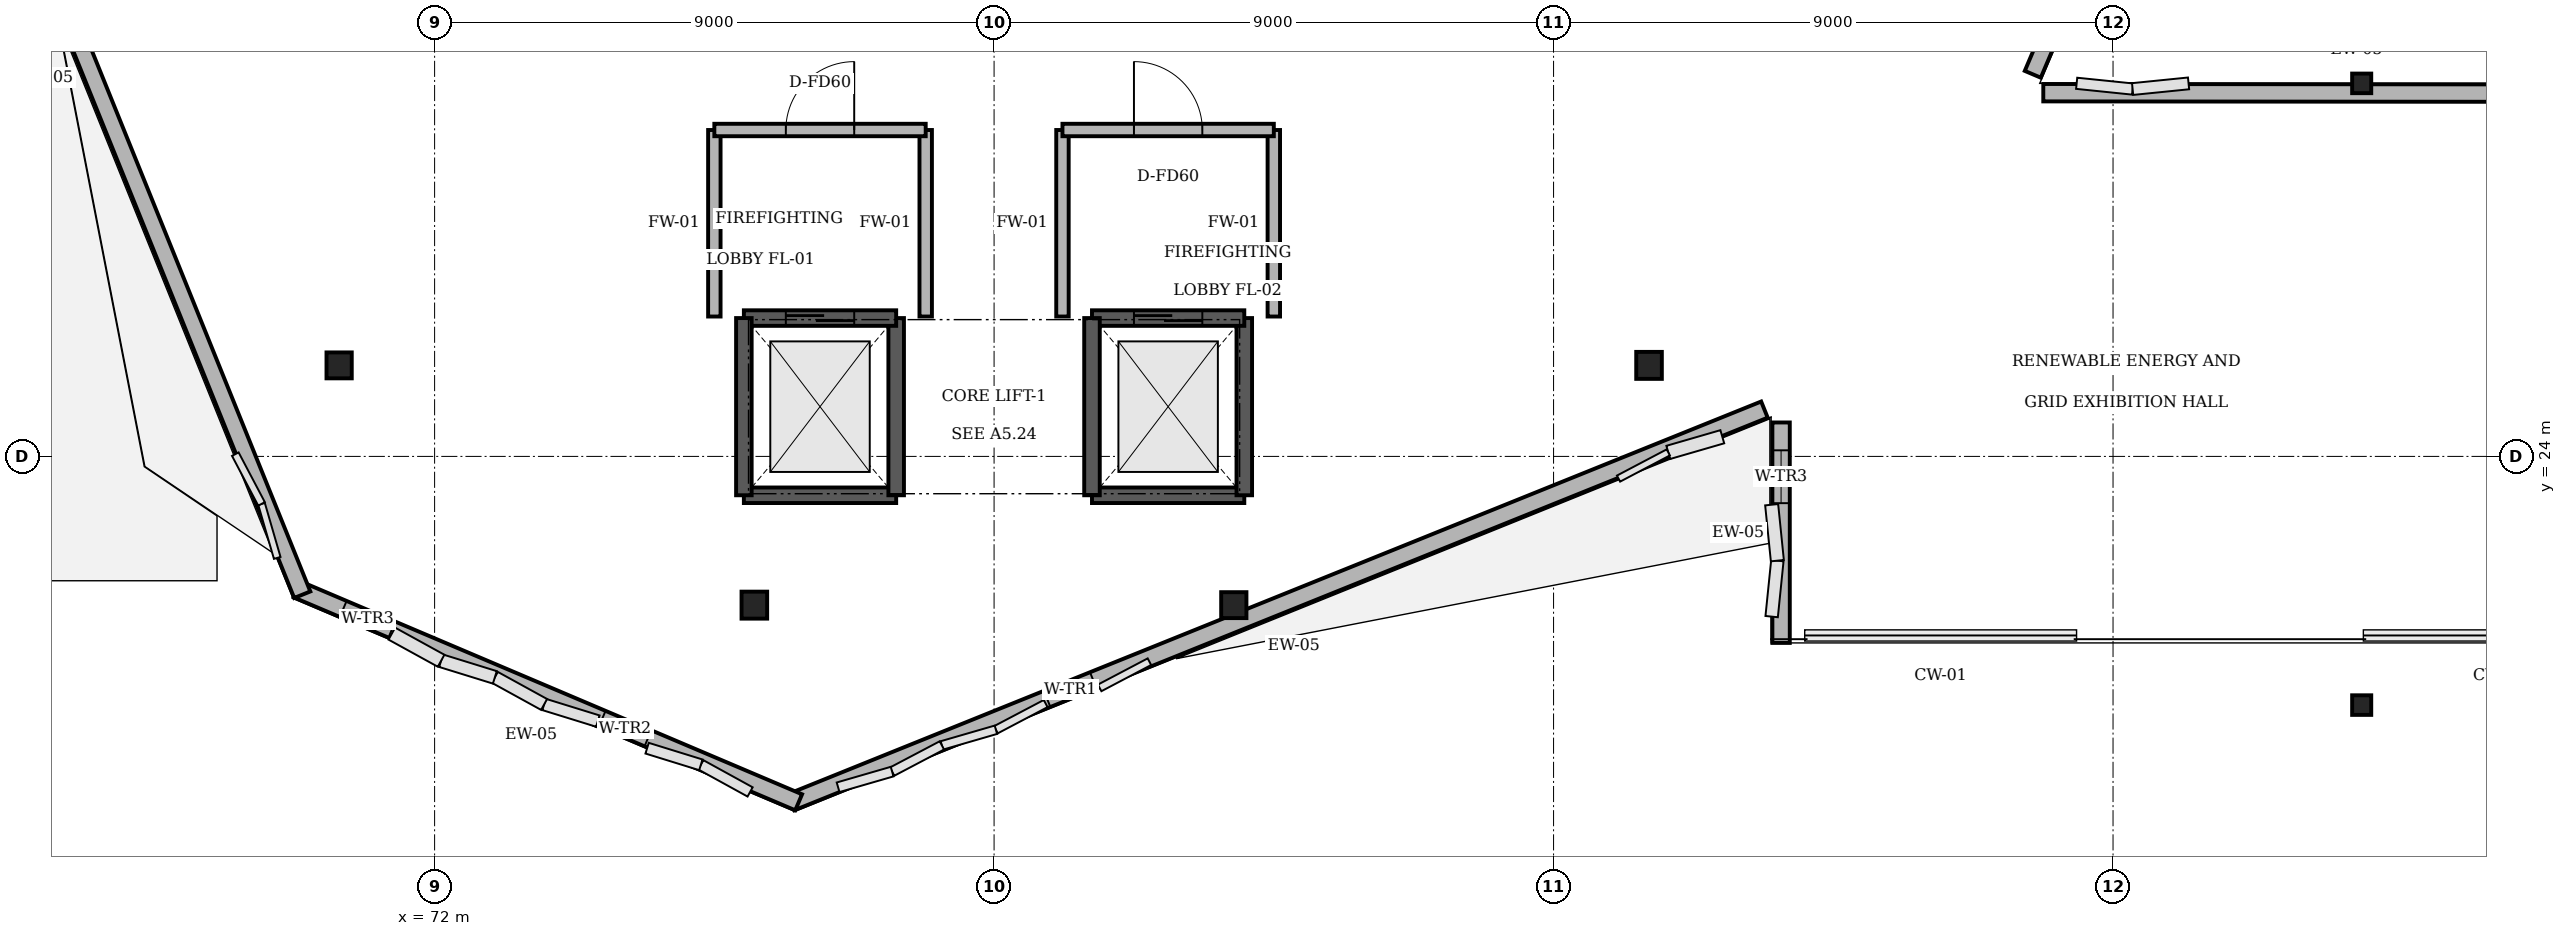
"""IFC4 building model, lengths in metres.
Left out: names, types, materials, properties, quantities, classifications, styles, units other than length and angle.
Written with IfcOpenShell. Run it as: python <this file> out.ifc"""

import sys

from ifc_helpers import new_model, si_unit, direction, frame, frame_2d, origin, origin_2d, place, context, subcontext, project, spatial, rectangle, i_section, extrude, element, fill, save


model = new_model("IFC4")
c1 = context("Model", 3, precision=1e-05, world=origin(), true_north=direction((0.0, 1.0)))
c2 = subcontext(c1, "Body", "Model", "MODEL_VIEW")
j1 = project(units=[si_unit("LENGTHUNIT", "METRE"), si_unit("PLANEANGLEUNIT", "RADIAN")], contexts=[c1])
p1 = place(None, origin())
s1 = spatial("IfcSite", under=j1, at=p1, CompositionType="ELEMENT")
p2 = place(p1, origin())
s2 = spatial("IfcBuilding", under=s1, at=p2, CompositionType="ELEMENT")
p3 = place(p2, frame((0.0, 0.0, 10.8)))
s3 = spatial("IfcBuildingStorey", under=s2, at=p3, CompositionType="ELEMENT", Elevation=10.8)
p4 = place(p3, frame((70.464, 25.464, 0.0), z_axis=(0.0, 0.0, 1.0), x_axis=(1.0, 0.0, 0.0)))
e1 = element("IfcColumn", 1, at=p4, inside=s3, PredefinedType="COLUMN", context=c2, shape_type="SweptSolid", body=[
    extrude(i_section(OverallWidth=0.406, OverallDepth=0.417, WebThickness=0.03, FlangeThickness=0.044, FilletRadius=0.015, at=origin_2d()), origin(), (0.0, 0.0, 1.0), 4.8),
])
p5 = place(p3, frame((77.144, 21.608, 0.0), z_axis=(0.0, 0.0, 1.0), x_axis=(1.0, 0.0, 0.0)))
e2 = element("IfcColumn", 2, at=p5, inside=s3, PredefinedType="COLUMN", context=c2, shape_type="SweptSolid", body=[
    extrude(i_section(OverallWidth=0.412, OverallDepth=0.434, WebThickness=0.036, FlangeThickness=0.044, FilletRadius=0.015, at=origin_2d()), origin(), (0.0, 0.0, 1.0), 4.8),
])
p6 = place(p3, frame((84.856, 21.608, 0.0), z_axis=(0.0, 0.0, 1.0), x_axis=(1.0, 0.0, 0.0)))
e3 = element("IfcColumn", 3, at=p6, inside=s3, PredefinedType="COLUMN", context=c2, shape_type="SweptSolid", body=[
    extrude(i_section(OverallWidth=0.406, OverallDepth=0.417, WebThickness=0.03, FlangeThickness=0.044, FilletRadius=0.015, at=origin_2d()), origin(), (0.0, 0.0, 1.0), 4.8),
])
p7 = place(p3, frame((91.536, 25.464, 0.0), z_axis=(0.0, 0.0, 1.0), x_axis=(1.0, 0.0, 0.0)))
e4 = element("IfcColumn", 4, at=p7, inside=s3, PredefinedType="COLUMN", context=c2, shape_type="SweptSolid", body=[
    extrude(i_section(OverallWidth=0.412, OverallDepth=0.434, WebThickness=0.036, FlangeThickness=0.044, FilletRadius=0.015, at=origin_2d()), origin(), (0.0, 0.0, 1.0), 4.8),
])
for number, where, z_axis, x_axis in (
    (5, (103.0, 20.0, 0.0), (0.0, 0.0, 1.0), (1.0, 0.0, 0.0)),
    (6, (103.0, 30.0, 0.0), (0.0, 0.0, 1.0), (1.0, 0.0, 0.0)),
):
    element("IfcColumn", number, at=place(p3, frame(where, z_axis=z_axis, x_axis=x_axis)), inside=s3, PredefinedType="COLUMN", context=c2, shape_type="SweptSolid", body=[
        extrude(i_section(OverallWidth=0.307, OverallDepth=0.315, WebThickness=0.012, FlangeThickness=0.019, FilletRadius=0.013, at=origin_2d()), origin(), (0.0, 0.0, 1.0), 4.8),
    ])
p8 = place(p3, frame((93.66, 21.0, 0.0), z_axis=(0.0, 0.0, 1.0), x_axis=(-6.8851556e-05, 0.99999999763, 0.0)))
e7 = element("IfcWall", 7, at=p8, inside=s3, PredefinedType="SOLIDWALL", context=c2, shape_type="SweptSolid", body=[
    extrude(rectangle(XDim=3.546, YDim=0.28, at=frame_2d((1.773, 0.0))), origin(), (0.0, 0.0, 1.0), 4.12),
])
p9 = place(p8, frame((2.248, 0.0, 1.05)))
e8 = element("IfcOpeningElement", 8, at=p9, cuts=e7, PredefinedType="OPENING", context=c2, shape_type="SweptSolid", body=[
    extrude(rectangle(XDim=0.85, YDim=1.6, at=frame_2d((0.425, 0.8))), frame((0.0, 0.15, 0.0), z_axis=(0.0, -1.0, 0.0), x_axis=(1.0, 0.0, 0.0)), (0.0, 0.0, 1.0), 0.3),
])
p10 = place(p3, frame((93.392, 24.753, 0.0), z_axis=(0.0, 0.0, 1.0), x_axis=(-0.927410810768, -0.374044366448, 0.0)))
e9 = element("IfcWall", 9, at=p10, inside=s3, PredefinedType="SOLIDWALL", context=c2, shape_type="SweptSolid", body=[
    extrude(rectangle(XDim=16.884, YDim=0.28, at=frame_2d((8.442, 0.0))), origin(), (0.0, 0.0, 1.0), 3.484),
])
p11 = place(p10, frame((11.642, 0.0, 1.05)))
e10 = element("IfcOpeningElement", 10, at=p11, cuts=e9, PredefinedType="OPENING", context=c2, shape_type="SweptSolid", body=[
    extrude(rectangle(XDim=0.8, YDim=1.5, at=frame_2d((0.4, 0.75))), frame((0.0, 0.15, 0.0), z_axis=(0.0, -1.0, 0.0), x_axis=(1.0, 0.0, 0.0)), (0.0, 0.0, 1.0), 0.3),
])
p12 = place(p3, frame((77.856, 18.437, 0.0), z_axis=(0.0, 0.0, 1.0), x_axis=(-0.920511993367, 0.390714307478, 0.0)))
e11 = element("IfcWall", 11, at=p12, inside=s3, PredefinedType="SOLIDWALL", context=c2, shape_type="SweptSolid", body=[
    extrude(rectangle(XDim=8.768, YDim=0.28, at=frame_2d((4.384, 0.0))), origin(), (0.0, 0.0, 1.0), 3.629),
])
p13 = place(p12, frame((2.634, 0.0, 1.05)))
e12 = element("IfcOpeningElement", 12, at=p13, cuts=e11, PredefinedType="OPENING", context=c2, shape_type="SweptSolid", body=[
    extrude(rectangle(XDim=0.8, YDim=1.7, at=frame_2d((0.4, 0.85))), frame((0.0, 0.15, 0.0), z_axis=(0.0, -1.0, 0.0), x_axis=(1.0, 0.0, 0.0)), (0.0, 0.0, 1.0), 0.3),
])
p14 = place(p12, frame((7.109, 0.0, 1.05)))
e13 = element("IfcOpeningElement", 13, at=p14, cuts=e11, PredefinedType="OPENING", context=c2, shape_type="SweptSolid", body=[
    extrude(rectangle(XDim=0.85, YDim=1.6, at=frame_2d((0.425, 0.8))), frame((0.0, 0.15, 0.0), z_axis=(0.0, -1.0, 0.0), x_axis=(1.0, 0.0, 0.0)), (0.0, 0.0, 1.0), 0.3),
])
p15 = place(p3, frame((69.871, 21.775, 0.0), z_axis=(0.0, 0.0, 1.0), x_axis=(-0.37460574737, 0.927184196391, 0.0)))
e14 = element("IfcWall", 14, at=p15, inside=s3, PredefinedType="SOLIDWALL", context=c2, shape_type="SweptSolid", body=[
    extrude(rectangle(XDim=18.5, YDim=0.28, at=frame_2d((9.25, 0.0))), origin(), (0.0, 0.0, 1.0), 3.634),
])
p16 = place(p15, frame((11.55, 0.0, 1.05)))
e15 = element("IfcOpeningElement", 15, at=p16, cuts=e14, PredefinedType="OPENING", context=c2, shape_type="SweptSolid", body=[
    extrude(rectangle(XDim=0.8, YDim=1.5, at=frame_2d((0.4, 0.75))), frame((0.0, 0.15, 0.0), z_axis=(0.0, -1.0, 0.0), x_axis=(1.0, 0.0, 0.0)), (0.0, 0.0, 1.0), 0.3),
])
p17 = place(p15, frame((16.05, 0.0, 1.05)))
e16 = element("IfcOpeningElement", 16, at=p17, cuts=e14, PredefinedType="OPENING", context=c2, shape_type="SweptSolid", body=[
    extrude(rectangle(XDim=0.8, YDim=1.7, at=frame_2d((0.4, 0.85))), frame((0.0, 0.15, 0.0), z_axis=(0.0, -1.0, 0.0), x_axis=(1.0, 0.0, 0.0)), (0.0, 0.0, 1.0), 0.3),
])
p18 = place(p3, frame((99.245, 33.765, 0.0), z_axis=(0.0, 0.0, 1.0), x_axis=(-0.390731644119, -0.92050463458, 0.0)))
e17 = element("IfcWall", 17, at=p18, inside=s3, PredefinedType="SOLIDWALL", context=c2, shape_type="SweptSolid", body=[
    extrude(rectangle(XDim=3.931, YDim=0.28, at=frame_2d((1.966, 0.0))), origin(), (0.0, 0.0, 1.0), 3.947),
])
p19 = place(p18, frame((2.466, 0.0, 1.05)))
e18 = element("IfcOpeningElement", 18, at=p19, cuts=e17, PredefinedType="OPENING", context=c2, shape_type="SweptSolid", body=[
    extrude(rectangle(XDim=0.8, YDim=1.7, at=frame_2d((0.4, 0.85))), frame((0.0, 0.15, 0.0), z_axis=(0.0, -1.0, 0.0), x_axis=(1.0, 0.0, 0.0)), (0.0, 0.0, 1.0), 0.3),
])
p20 = place(p3, frame((97.878, 29.85, 0.0), z_axis=(0.0, 0.0, 1.0), x_axis=(0.999999619377, -0.000872494275, 0.0)))
e19 = element("IfcWall", 19, at=p20, inside=s3, PredefinedType="SOLIDWALL", context=c2, shape_type="SweptSolid", body=[
    extrude(rectangle(XDim=10.073, YDim=0.28, at=frame_2d((5.037, 0.0))), origin(), (0.0, 0.0, 1.0), 3.573),
])
p21 = place(p3, frame((76.975, 23.375, 0.0), z_axis=(0.0, 0.0, 1.0), x_axis=(1.0, 0.0, 0.0)))
e20 = element("IfcWall", 20, at=p21, inside=s3, PredefinedType="SOLIDWALL", context=c2, shape_type="SweptSolid", body=[
    extrude(rectangle(XDim=2.45, YDim=0.25, at=frame_2d((1.225, 0.0))), origin(), (0.0, 0.0, 1.0), 4.8),
])
p22 = place(p3, frame((79.425, 23.375, 0.0), z_axis=(0.0, 0.0, 1.0), x_axis=(0.0, 1.0, 0.0)))
e21 = element("IfcWall", 21, at=p22, inside=s3, PredefinedType="SOLIDWALL", context=c2, shape_type="SweptSolid", body=[
    extrude(rectangle(XDim=2.85, YDim=0.25, at=frame_2d((1.425, 0.0))), origin(), (0.0, 0.0, 1.0), 4.8),
])
p23 = place(p3, frame((79.425, 26.225, 0.0), z_axis=(0.0, 0.0, 1.0), x_axis=(-1.0, 0.0, 0.0)))
e22 = element("IfcWall", 22, at=p23, inside=s3, PredefinedType="SOLIDWALL", context=c2, shape_type="SweptSolid", body=[
    extrude(rectangle(XDim=2.45, YDim=0.25, at=frame_2d((1.225, 0.0))), origin(), (0.0, 0.0, 1.0), 4.8),
])
p24 = place(p23, frame((0.675, 0.0, 0.0)))
e23 = element("IfcOpeningElement", 23, at=p24, cuts=e22, PredefinedType="OPENING", context=c2, shape_type="SweptSolid", body=[
    extrude(rectangle(XDim=1.1, YDim=2.2, at=frame_2d((0.55, 1.1))), frame((0.0, 0.135, 0.0), z_axis=(0.0, -1.0, 0.0), x_axis=(1.0, 0.0, 0.0)), (0.0, 0.0, 1.0), 0.27),
])
p25 = place(p3, frame((76.975, 26.225, 0.0), z_axis=(0.0, 0.0, 1.0), x_axis=(0.0, -1.0, 0.0)))
e24 = element("IfcWall", 24, at=p25, inside=s3, PredefinedType="SOLIDWALL", context=c2, shape_type="SweptSolid", body=[
    extrude(rectangle(XDim=2.85, YDim=0.25, at=frame_2d((1.425, 0.0))), origin(), (0.0, 0.0, 1.0), 4.8),
])
p26 = place(p3, frame((76.5, 26.25, 0.0), z_axis=(0.0, 0.0, 1.0), x_axis=(0.0, 1.0, 0.0)))
e25 = element("IfcWall", 25, at=p26, inside=s3, PredefinedType="SOLIDWALL", context=c2, shape_type="SweptSolid", body=[
    extrude(rectangle(XDim=3.0, YDim=0.2, at=frame_2d((1.5, 0.0))), origin(), (0.0, 0.0, 1.0), 3.629),
])
p27 = place(p3, frame((79.9, 26.25, 0.0), z_axis=(0.0, 0.0, 1.0), x_axis=(0.0, 1.0, 0.0)))
e26 = element("IfcWall", 26, at=p27, inside=s3, PredefinedType="SOLIDWALL", context=c2, shape_type="SweptSolid", body=[
    extrude(rectangle(XDim=3.0, YDim=0.2, at=frame_2d((1.5, 0.0))), origin(), (0.0, 0.0, 1.0), 3.99),
])
p28 = place(p3, frame((76.5, 29.25, 0.0), z_axis=(0.0, 0.0, 1.0), x_axis=(1.0, 0.0, 0.0)))
e27 = element("IfcWall", 27, at=p28, inside=s3, PredefinedType="SOLIDWALL", context=c2, shape_type="SweptSolid", body=[
    extrude(rectangle(XDim=3.4, YDim=0.2, at=frame_2d((1.7, 0.0))), origin(), (0.0, 0.0, 1.0), 3.629),
])
p29 = place(p28, frame((1.15, 0.0, 0.0)))
e28 = element("IfcOpeningElement", 28, at=p29, cuts=e27, PredefinedType="OPENING", context=c2, shape_type="SweptSolid", body=[
    extrude(rectangle(XDim=1.1, YDim=2.2, at=frame_2d((0.55, 1.1))), frame((0.0, 0.11, 0.0), z_axis=(0.0, -1.0, 0.0), x_axis=(1.0, 0.0, 0.0)), (0.0, 0.0, 1.0), 0.22),
])
p30 = place(p3, frame((82.575, 23.375, 0.0), z_axis=(0.0, 0.0, 1.0), x_axis=(1.0, 0.0, 0.0)))
e29 = element("IfcWall", 29, at=p30, inside=s3, PredefinedType="SOLIDWALL", context=c2, shape_type="SweptSolid", body=[
    extrude(rectangle(XDim=2.45, YDim=0.25, at=frame_2d((1.225, 0.0))), origin(), (0.0, 0.0, 1.0), 4.8),
])
p31 = place(p3, frame((85.025, 23.375, 0.0), z_axis=(0.0, 0.0, 1.0), x_axis=(0.0, 1.0, 0.0)))
e30 = element("IfcWall", 30, at=p31, inside=s3, PredefinedType="SOLIDWALL", context=c2, shape_type="SweptSolid", body=[
    extrude(rectangle(XDim=2.85, YDim=0.25, at=frame_2d((1.425, 0.0))), origin(), (0.0, 0.0, 1.0), 4.8),
])
p32 = place(p3, frame((85.025, 26.225, 0.0), z_axis=(0.0, 0.0, 1.0), x_axis=(-1.0, 0.0, 0.0)))
e31 = element("IfcWall", 31, at=p32, inside=s3, PredefinedType="SOLIDWALL", context=c2, shape_type="SweptSolid", body=[
    extrude(rectangle(XDim=2.45, YDim=0.25, at=frame_2d((1.225, 0.0))), origin(), (0.0, 0.0, 1.0), 4.8),
])
p33 = place(p32, frame((0.675, 0.0, 0.0)))
e32 = element("IfcOpeningElement", 32, at=p33, cuts=e31, PredefinedType="OPENING", context=c2, shape_type="SweptSolid", body=[
    extrude(rectangle(XDim=1.1, YDim=2.2, at=frame_2d((0.55, 1.1))), frame((0.0, 0.135, 0.0), z_axis=(0.0, -1.0, 0.0), x_axis=(1.0, 0.0, 0.0)), (0.0, 0.0, 1.0), 0.27),
])
p34 = place(p3, frame((82.575, 26.225, 0.0), z_axis=(0.0, 0.0, 1.0), x_axis=(0.0, -1.0, 0.0)))
e33 = element("IfcWall", 33, at=p34, inside=s3, PredefinedType="SOLIDWALL", context=c2, shape_type="SweptSolid", body=[
    extrude(rectangle(XDim=2.85, YDim=0.25, at=frame_2d((1.425, 0.0))), origin(), (0.0, 0.0, 1.0), 4.8),
])
p35 = place(p3, frame((82.1, 26.25, 0.0), z_axis=(0.0, 0.0, 1.0), x_axis=(0.0, 1.0, 0.0)))
e34 = element("IfcWall", 34, at=p35, inside=s3, PredefinedType="SOLIDWALL", context=c2, shape_type="SweptSolid", body=[
    extrude(rectangle(XDim=3.0, YDim=0.2, at=frame_2d((1.5, 0.0))), origin(), (0.0, 0.0, 1.0), 3.99),
])
p36 = place(p3, frame((85.5, 26.25, 0.0), z_axis=(0.0, 0.0, 1.0), x_axis=(0.0, 1.0, 0.0)))
e35 = element("IfcWall", 35, at=p36, inside=s3, PredefinedType="SOLIDWALL", context=c2, shape_type="SweptSolid", body=[
    extrude(rectangle(XDim=3.0, YDim=0.2, at=frame_2d((1.5, 0.0))), origin(), (0.0, 0.0, 1.0), 3.634),
])
p37 = place(p3, frame((82.1, 29.25, 0.0), z_axis=(0.0, 0.0, 1.0), x_axis=(1.0, 0.0, 0.0)))
e36 = element("IfcWall", 36, at=p37, inside=s3, PredefinedType="SOLIDWALL", context=c2, shape_type="SweptSolid", body=[
    extrude(rectangle(XDim=3.4, YDim=0.2, at=frame_2d((1.7, 0.0))), origin(), (0.0, 0.0, 1.0), 3.634),
])
p38 = place(p37, frame((1.15, 0.0, 0.0)))
e37 = element("IfcOpeningElement", 37, at=p38, cuts=e36, PredefinedType="OPENING", context=c2, shape_type="SweptSolid", body=[
    extrude(rectangle(XDim=1.1, YDim=2.2, at=frame_2d((0.55, 1.1))), frame((0.0, 0.11, 0.0), z_axis=(0.0, -1.0, 0.0), x_axis=(1.0, 0.0, 0.0)), (0.0, 0.0, 1.0), 0.22),
])
p39 = place(p9, origin())
e38 = element("IfcWindow", 38, at=p39, inside=s3, PartitioningType="SINGLE_PANEL", PredefinedType="WINDOW", context=c2, shape_type="SweptSolid", body=[
    extrude(rectangle(XDim=0.85, YDim=1.6, at=frame_2d((0.425, 0.8))), frame((0.0, 0.03, 0.0), z_axis=(0.0, -1.0, 0.0), x_axis=(1.0, 0.0, 0.0)), (0.0, 0.0, 1.0), 0.06),
])
fill(e8, e38)
p40 = place(p11, origin())
e39 = element("IfcWindow", 39, at=p40, inside=s3, PartitioningType="SINGLE_PANEL", PredefinedType="WINDOW", context=c2, shape_type="SweptSolid", body=[
    extrude(rectangle(XDim=0.8, YDim=1.5, at=frame_2d((0.4, 0.75))), frame((0.0, 0.03, 0.0), z_axis=(0.0, -1.0, 0.0), x_axis=(1.0, 0.0, 0.0)), (0.0, 0.0, 1.0), 0.06),
])
fill(e10, e39)
p41 = place(p13, origin())
e40 = element("IfcWindow", 40, at=p41, inside=s3, PartitioningType="SINGLE_PANEL", PredefinedType="WINDOW", context=c2, shape_type="SweptSolid", body=[
    extrude(rectangle(XDim=0.8, YDim=1.7, at=frame_2d((0.4, 0.85))), frame((0.0, 0.03, 0.0), z_axis=(0.0, -1.0, 0.0), x_axis=(1.0, 0.0, 0.0)), (0.0, 0.0, 1.0), 0.06),
])
fill(e12, e40)
p42 = place(p14, origin())
e41 = element("IfcWindow", 41, at=p42, inside=s3, PartitioningType="SINGLE_PANEL", PredefinedType="WINDOW", context=c2, shape_type="SweptSolid", body=[
    extrude(rectangle(XDim=0.85, YDim=1.6, at=frame_2d((0.425, 0.8))), frame((0.0, 0.03, 0.0), z_axis=(0.0, -1.0, 0.0), x_axis=(1.0, 0.0, 0.0)), (0.0, 0.0, 1.0), 0.06),
])
fill(e13, e41)
p43 = place(p24, origin())
e42 = element("IfcDoor", 42, at=p43, inside=s3, OperationType="SLIDING_TO_LEFT", PredefinedType="DOOR", context=c2, shape_type="SweptSolid", body=[
    extrude(rectangle(XDim=1.1, YDim=2.2, at=frame_2d((0.55, 1.1))), frame((0.0, 0.025, 0.0), z_axis=(0.0, -1.0, 0.0), x_axis=(1.0, 0.0, 0.0)), (0.0, 0.0, 1.0), 0.05),
])
fill(e23, e42)
p44 = place(p29, origin())
e43 = element("IfcDoor", 43, at=p44, inside=s3, OperationType="SINGLE_SWING_RIGHT", PredefinedType="DOOR", context=c2, shape_type="SweptSolid", body=[
    extrude(rectangle(XDim=1.1, YDim=2.2, at=frame_2d((0.55, 1.1))), frame((0.0, 0.025, 0.0), z_axis=(0.0, -1.0, 0.0), x_axis=(1.0, 0.0, 0.0)), (0.0, 0.0, 1.0), 0.05),
])
fill(e28, e43)
p45 = place(p33, origin())
e44 = element("IfcDoor", 44, at=p45, inside=s3, OperationType="SLIDING_TO_LEFT", PredefinedType="DOOR", context=c2, shape_type="SweptSolid", body=[
    extrude(rectangle(XDim=1.1, YDim=2.2, at=frame_2d((0.55, 1.1))), frame((0.0, 0.025, 0.0), z_axis=(0.0, -1.0, 0.0), x_axis=(1.0, 0.0, 0.0)), (0.0, 0.0, 1.0), 0.05),
])
fill(e32, e44)
p46 = place(p38, origin())
e45 = element("IfcDoor", 45, at=p46, inside=s3, OperationType="SINGLE_SWING_LEFT", PredefinedType="DOOR", context=c2, shape_type="SweptSolid", body=[
    extrude(rectangle(XDim=1.1, YDim=2.2, at=frame_2d((0.55, 1.1))), frame((0.0, 0.025, 0.0), z_axis=(0.0, -1.0, 0.0), x_axis=(1.0, 0.0, 0.0)), (0.0, 0.0, 1.0), 0.05),
])
fill(e37, e45)
save(model, sys.argv[1])
